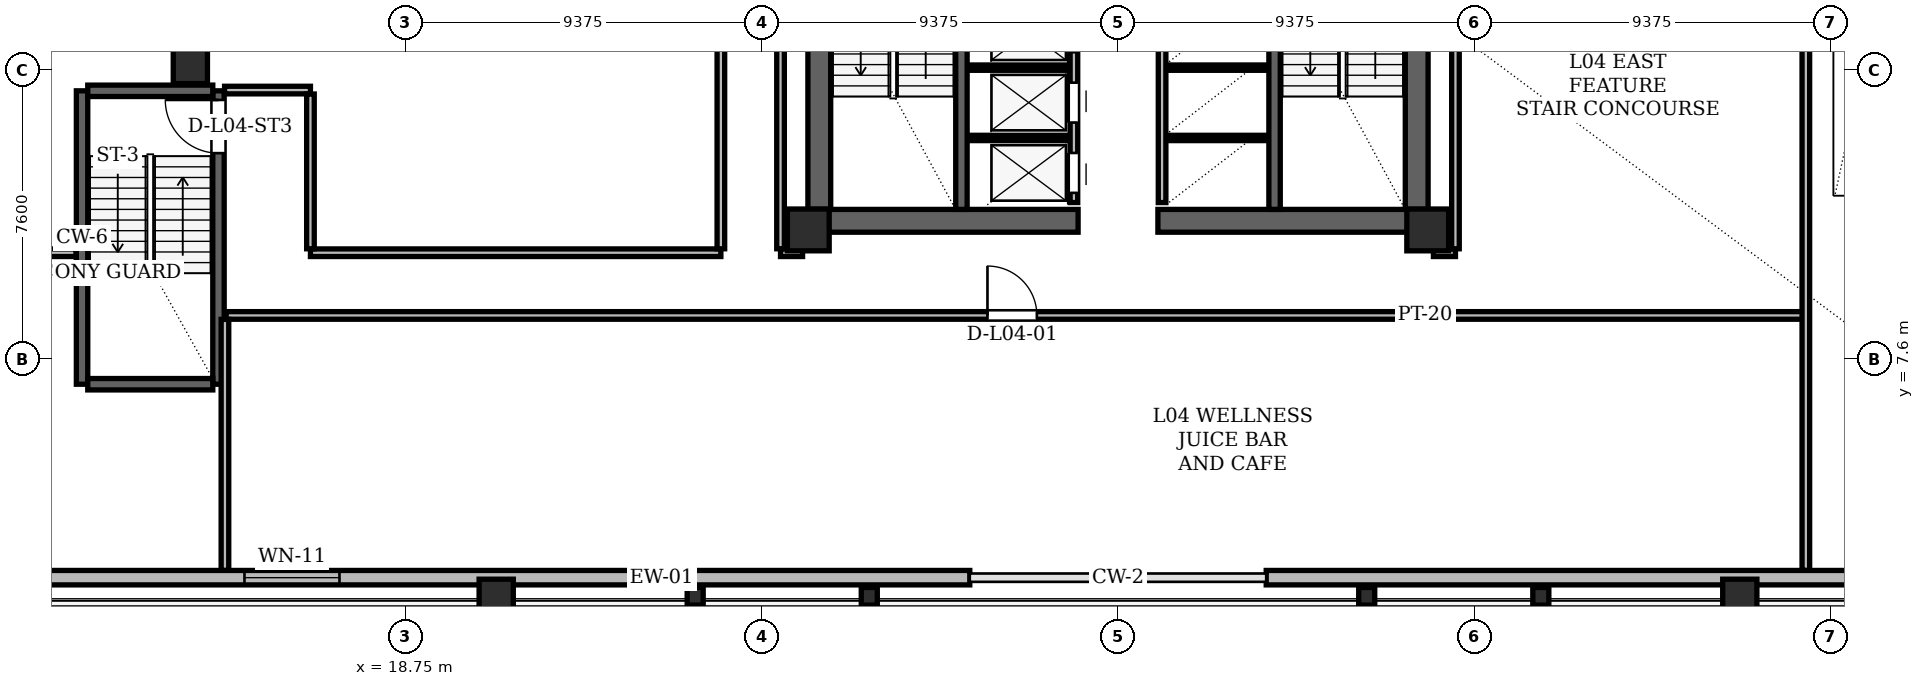
"""IFC4 building model, lengths in metres.
Left out: names, types, materials, properties, quantities, classifications, styles, units other than length and angle.
Written with IfcOpenShell. Run it as: python <this file> out.ifc"""

import sys

from ifc_helpers import new_model, si_unit, direction, frame, frame_2d, origin, origin_2d, place, context, subcontext, project, spatial, rectangle, hollow_rectangle, i_section, extrude, element, fill, save


model = new_model("IFC4")
c1 = context("Model", 3, precision=1e-05, world=origin(), true_north=direction((0.0, 1.0)))
c2 = subcontext(c1, "Body", "Model", "MODEL_VIEW")
j1 = project(units=[si_unit("LENGTHUNIT", "METRE"), si_unit("PLANEANGLEUNIT", "RADIAN")], contexts=[c1])
p1 = place(None, origin())
s1 = spatial("IfcSite", under=j1, at=p1, CompositionType="ELEMENT")
p2 = place(p1, origin())
s2 = spatial("IfcBuilding", under=s1, at=p2, CompositionType="ELEMENT")
p3 = place(p2, frame((0.0, 0.0, 18.3)))
s3 = spatial("IfcBuildingStorey", under=s2, at=p3, CompositionType="ELEMENT", Elevation=18.3)
for number, where, z_axis, x_axis in (
    (1, (29.35, 11.0, 0.0), (0.0, 0.0, 1.0), (1.0, 0.0, 0.0)),
    (2, (45.65, 11.0, 0.0), (0.0, 0.0, 1.0), (1.0, 0.0, 0.0)),
):
    element("IfcColumn", number, at=place(p3, frame(where, z_axis=z_axis, x_axis=x_axis)), inside=s3, PredefinedType="COLUMN", context=c2, shape_type="SweptSolid", body=[
        extrude(hollow_rectangle(XDim=1.1, YDim=1.1, WallThickness=0.09, at=origin_2d()), origin(), (0.0, 0.0, 1.0), 4.2),
    ])
for number, where, z_axis, x_axis in (
    (3, (13.09, 15.3, 0.004), (0.0, 0.0, 1.0), (1.0, 0.0, 0.0)),
    (4, (21.138, 1.36, 0.004), (0.0, 0.0, 1.0), (1.0, 0.0, 0.0)),
    (5, (53.862, 1.36, 0.004), (0.0, 0.0, 1.0), (1.0, 0.0, 0.0)),
):
    element("IfcColumn", number, at=place(p3, frame(where, z_axis=z_axis, x_axis=x_axis)), inside=s3, PredefinedType="COLUMN", context=c2, shape_type="SweptSolid", body=[
        extrude(hollow_rectangle(XDim=0.9, YDim=0.9, WallThickness=0.075, at=origin_2d()), origin(), (0.0, 0.0, 1.0), 4.191),
    ])
for number, where, z_axis, x_axis in (
    (6, (26.374, 1.36, 0.004), (0.0, 0.0, 1.0), (1.0, 0.0, 0.0)),
    (7, (30.955, 1.36, 0.004), (0.0, 0.0, 1.0), (1.0, 0.0, 0.0)),
    (8, (44.045, 1.36, 0.004), (0.0, 0.0, 1.0), (1.0, 0.0, 0.0)),
    (9, (48.626, 1.36, 0.004), (0.0, 0.0, 1.0), (1.0, 0.0, 0.0)),
):
    element("IfcColumn", number, at=place(p3, frame(where, z_axis=z_axis, x_axis=x_axis)), inside=s3, PredefinedType="COLUMN", context=c2, shape_type="SweptSolid", body=[
        extrude(i_section(OverallWidth=0.422, OverallDepth=0.465, WebThickness=0.045, FlangeThickness=0.072, at=origin_2d()), origin(), (0.0, 0.0, 1.0), 4.191),
    ])
for number, where, z_axis, x_axis in (
    (10, (29.64, 11.0, 0.0), (0.0, 0.0, 1.0), (0.0, 1.0, 0.0)),
    (11, (45.36, 11.0, 0.0), (0.0, 0.0, 1.0), (0.0, 1.0, 0.0)),
):
    element("IfcWall", number, at=place(p3, frame(where, z_axis=z_axis, x_axis=x_axis)), inside=s3, PredefinedType="SHEAR", context=c2, shape_type="SweptSolid", body=[
        extrude(rectangle(XDim=13.3, YDim=0.6, at=frame_2d((6.65, 0.0))), origin(), (0.0, 0.0, 1.0), 3.88),
    ])
for number, where, z_axis, x_axis in (
    (12, (29.35, 11.24, 0.0), (0.0, 0.0, 1.0), (1.0, 0.0, 0.0)),
    (13, (38.55, 11.24, 0.0), (0.0, 0.0, 1.0), (1.0, 0.0, 0.0)),
):
    element("IfcWall", number, at=place(p3, frame(where, z_axis=z_axis, x_axis=x_axis)), inside=s3, PredefinedType="SHEAR", context=c2, shape_type="SweptSolid", body=[
        extrude(rectangle(XDim=7.1, YDim=0.6, at=frame_2d((3.55, 0.0))), origin(), (0.0, 0.0, 1.0), 3.88),
    ])
for number, where, z_axis, x_axis in (
    (14, (33.38, 11.54, 0.0), (0.0, 0.0, 1.0), (0.0, 1.0, 0.0)),
    (15, (41.62, 11.54, 0.0), (0.0, 0.0, 1.0), (0.0, 1.0, 0.0)),
):
    element("IfcWall", number, at=place(p3, frame(where, z_axis=z_axis, x_axis=x_axis)), inside=s3, PredefinedType="SHEAR", context=c2, shape_type="SweptSolid", body=[
        extrude(rectangle(XDim=7.62, YDim=0.3, at=frame_2d((3.81, 0.0))), origin(), (0.0, 0.0, 1.0), 3.88),
    ])
p4 = place(p3, frame((10.24, 6.94, 0.0), z_axis=(0.0, 0.0, 1.0), x_axis=(0.0, 1.0, 0.0)))
e16 = element("IfcWall", 16, at=p4, inside=s3, PredefinedType="SHEAR", context=c2, shape_type="SweptSolid", body=[
    extrude(rectangle(XDim=7.72, YDim=0.3, at=frame_2d((3.86, 0.0))), origin(), (0.0, 0.0, 1.0), 3.88),
])
p5 = place(p3, frame((13.83, 6.94, 0.0), z_axis=(0.0, 0.0, 1.0), x_axis=(0.0, 1.0, 0.0)))
e17 = element("IfcWall", 17, at=p5, inside=s3, PredefinedType="SHEAR", context=c2, shape_type="SweptSolid", body=[
    extrude(rectangle(XDim=7.72, YDim=0.3, at=frame_2d((3.86, 0.0))), origin(), (0.0, 0.0, 1.0), 3.88),
])
p6 = place(p5, frame((6.08, 0.0, 0.0)))
e18 = element("IfcOpeningElement", 18, at=p6, cuts=e17, PredefinedType="OPENING", context=c2, shape_type="SweptSolid", body=[
    extrude(rectangle(XDim=1.4, YDim=2.2, at=frame_2d((0.7, 1.1))), frame((0.0, 0.15, 0.0), z_axis=(0.0, -1.0, 0.0), x_axis=(1.0, 0.0, 0.0)), (0.0, 0.0, 1.0), 0.3),
])
for number, where, z_axis, x_axis in (
    (19, (10.39, 6.94, 0.0), (0.0, 0.0, 1.0), (1.0, 0.0, 0.0)),
    (20, (10.39, 14.66, 0.0), (0.0, 0.0, 1.0), (1.0, 0.0, 0.0)),
):
    element("IfcWall", number, at=place(p3, frame(where, z_axis=z_axis, x_axis=x_axis)), inside=s3, PredefinedType="SHEAR", context=c2, shape_type="SweptSolid", body=[
        extrude(rectangle(XDim=3.29, YDim=0.3, at=frame_2d((1.645, 0.0))), origin(), (0.0, 0.0, 1.0), 3.88),
    ])
p7 = place(p3, frame((8.828, 1.85, 0.0), z_axis=(0.0, 0.0, 1.0), x_axis=(1.0, 0.0, 0.0)))
e21 = element("IfcWall", 21, at=p7, inside=s3, PredefinedType="SOLIDWALL", context=c2, shape_type="SweptSolid", body=[
    extrude(rectangle(XDim=24.772, YDim=0.38, at=frame_2d((12.386, 0.0))), origin(), (0.0, 0.0, 1.0), 2.943),
])
p8 = place(p7, frame((5.686, 0.0, 0.85)))
e22 = element("IfcOpeningElement", 22, at=p8, cuts=e21, PredefinedType="OPENING", context=c2, shape_type="SweptSolid", body=[
    extrude(rectangle(XDim=2.5, YDim=1.923, at=frame_2d((1.25, 0.961))), frame((0.0, 0.19, 0.0), z_axis=(0.0, -1.0, 0.0), x_axis=(1.0, 0.0, 0.0)), (0.0, 0.0, 1.0), 0.38),
])
p9 = place(p3, frame((41.4, 1.85, 0.0), z_axis=(0.0, 0.0, 1.0), x_axis=(1.0, 0.0, 0.0)))
e23 = element("IfcWall", 23, at=p9, inside=s3, PredefinedType="SOLIDWALL", context=c2, shape_type="SweptSolid", body=[
    extrude(rectangle(XDim=24.772, YDim=0.38, at=frame_2d((12.386, 0.0))), origin(), (0.0, 0.0, 1.0), 2.943),
])
p10 = place(p9, frame((16.586, 0.0, 0.85)))
e24 = element("IfcOpeningElement", 24, at=p10, cuts=e23, PredefinedType="OPENING", context=c2, shape_type="SweptSolid", body=[
    extrude(rectangle(XDim=2.5, YDim=1.923, at=frame_2d((1.25, 0.961))), frame((0.0, 0.19, 0.0), z_axis=(0.0, -1.0, 0.0), x_axis=(1.0, 0.0, 0.0)), (0.0, 0.0, 1.0), 0.38),
])
p11 = place(p3, frame((36.34, 11.72, 0.0), z_axis=(0.0, 0.0, 1.0), x_axis=(0.0, 1.0, 0.0)))
e25 = element("IfcWall", 25, at=p11, inside=s3, PredefinedType="PARTITIONING", context=c2, shape_type="SweptSolid", body=[
    extrude(rectangle(XDim=7.6, YDim=0.2, at=frame_2d((3.8, 0.0))), origin(), (0.0, 0.0, 1.0), 3.88),
])
p12 = place(p11, frame((0.255, 0.0, 0.0)))
e26 = element("IfcOpeningElement", 26, at=p12, cuts=e25, PredefinedType="OPENING", context=c2, shape_type="SweptSolid", body=[
    extrude(rectangle(XDim=1.05, YDim=2.15, at=frame_2d((0.525, 1.075))), frame((0.0, 0.1, 0.0), z_axis=(0.0, -1.0, 0.0), x_axis=(1.0, 0.0, 0.0)), (0.0, 0.0, 1.0), 0.2),
])
p13 = place(p11, frame((2.105, 0.0, 0.0)))
e27 = element("IfcOpeningElement", 27, at=p13, cuts=e25, PredefinedType="OPENING", context=c2, shape_type="SweptSolid", body=[
    extrude(rectangle(XDim=1.05, YDim=2.15, at=frame_2d((0.525, 1.075))), frame((0.0, 0.1, 0.0), z_axis=(0.0, -1.0, 0.0), x_axis=(1.0, 0.0, 0.0)), (0.0, 0.0, 1.0), 0.2),
])
p14 = place(p11, frame((3.955, 0.0, 0.0)))
e28 = element("IfcOpeningElement", 28, at=p14, cuts=e25, PredefinedType="OPENING", context=c2, shape_type="SweptSolid", body=[
    extrude(rectangle(XDim=1.05, YDim=2.15, at=frame_2d((0.525, 1.075))), frame((0.0, 0.1, 0.0), z_axis=(0.0, -1.0, 0.0), x_axis=(1.0, 0.0, 0.0)), (0.0, 0.0, 1.0), 0.2),
])
for number, where, z_axis, x_axis in (
    (29, (33.56, 13.42, 0.0), (0.0, 0.0, 1.0), (1.0, 0.0, 0.0)),
    (30, (33.56, 15.27, 0.0), (0.0, 0.0, 1.0), (1.0, 0.0, 0.0)),
):
    element("IfcWall", number, at=place(p3, frame(where, z_axis=z_axis, x_axis=x_axis)), inside=s3, PredefinedType="PARTITIONING", context=c2, shape_type="SweptSolid", body=[
        extrude(rectangle(XDim=2.66, YDim=0.14, at=frame_2d((1.33, 0.0))), origin(), (0.0, 0.0, 1.0), 3.88),
    ])
p15 = place(p3, frame((38.66, 11.72, 0.0), z_axis=(0.0, 0.0, 1.0), x_axis=(0.0, 1.0, 0.0)))
e31 = element("IfcWall", 31, at=p15, inside=s3, PredefinedType="PARTITIONING", context=c2, shape_type="SweptSolid", body=[
    extrude(rectangle(XDim=9.1, YDim=0.2, at=frame_2d((4.55, 0.0))), origin(), (0.0, 0.0, 1.0), 3.88),
])
for number, where, z_axis, x_axis in (
    (32, (38.78, 13.42, 0.0), (0.0, 0.0, 1.0), (1.0, 0.0, 0.0)),
    (33, (38.78, 15.27, 0.0), (0.0, 0.0, 1.0), (1.0, 0.0, 0.0)),
):
    element("IfcWall", number, at=place(p3, frame(where, z_axis=z_axis, x_axis=x_axis)), inside=s3, PredefinedType="PARTITIONING", context=c2, shape_type="SweptSolid", body=[
        extrude(rectangle(XDim=2.66, YDim=0.14, at=frame_2d((1.33, 0.0))), origin(), (0.0, 0.0, 1.0), 3.88),
    ])
p16 = place(p3, frame((14.03, 8.75, 0.0), z_axis=(0.0, 0.0, 1.0), x_axis=(1.0, 0.0, 0.0)))
e34 = element("IfcWall", 34, at=p16, inside=s3, PredefinedType="PARTITIONING", context=c2, shape_type="SweptSolid", body=[
    extrude(rectangle(XDim=41.57, YDim=0.2, at=frame_2d((20.785, 0.0))), origin(), (0.0, 0.0, 1.0), 2.943),
])
p17 = place(p16, frame((20.035, 0.0, 0.0)))
e35 = element("IfcOpeningElement", 35, at=p17, cuts=e34, PredefinedType="OPENING", context=c2, shape_type="SweptSolid", body=[
    extrude(rectangle(XDim=1.3, YDim=2.2, at=frame_2d((0.65, 1.1))), frame((0.0, 0.1, 0.0), z_axis=(0.0, -1.0, 0.0), x_axis=(1.0, 0.0, 0.0)), (0.0, 0.0, 1.0), 0.2),
])
p18 = place(p3, frame((6.344, 10.4, 0.0), z_axis=(0.0, 0.0, 1.0), x_axis=(1.0, 0.0, 0.0)))
e36 = element("IfcWall", 36, at=p18, inside=s3, PredefinedType="PARTITIONING", context=c2, shape_type="SweptSolid", body=[
    extrude(rectangle(XDim=3.736, YDim=0.2, at=frame_2d((1.868, 0.0))), origin(), (0.0, 0.0, 1.0), 2.943),
])
p19 = place(p3, frame((16.25, 10.4, 0.0), z_axis=(0.0, 0.0, 1.0), x_axis=(1.0, 0.0, 0.0)))
e37 = element("IfcWall", 37, at=p19, inside=s3, PredefinedType="PARTITIONING", context=c2, shape_type="SweptSolid", body=[
    extrude(rectangle(XDim=10.8, YDim=0.2, at=frame_2d((5.4, 0.0))), origin(), (0.0, 0.0, 1.0), 3.88),
])
for number, where, z_axis, x_axis in (
    (38, (28.62, 10.4, 0.0), (0.0, 0.0, 1.0), (1.0, 0.0, 0.0)),
    (39, (45.8, 10.4, 0.0), (0.0, 0.0, 1.0), (1.0, 0.0, 0.0)),
):
    element("IfcWall", number, at=place(p3, frame(where, z_axis=z_axis, x_axis=x_axis)), inside=s3, PredefinedType="PARTITIONING", context=c2, shape_type="SweptSolid", body=[
        extrude(rectangle(XDim=0.58, YDim=0.2, at=frame_2d((0.29, 0.0))), origin(), (0.0, 0.0, 1.0), 2.943),
    ])
p20 = place(p3, frame((13.99, 14.68, 0.0), z_axis=(0.0, 0.0, 1.0), x_axis=(1.0, 0.0, 0.0)))
e40 = element("IfcWall", 40, at=p20, inside=s3, PredefinedType="PARTITIONING", context=c2, shape_type="SweptSolid", body=[
    extrude(rectangle(XDim=2.26, YDim=0.2, at=frame_2d((1.13, 0.0))), origin(), (0.0, 0.0, 1.0), 2.943),
])
p21 = place(p3, frame((14.0, 2.044, 0.0), z_axis=(0.0, 0.0, 1.0), x_axis=(0.0, 1.0, 0.0)))
e41 = element("IfcWall", 41, at=p21, inside=s3, PredefinedType="PARTITIONING", context=c2, shape_type="SweptSolid", body=[
    extrude(rectangle(XDim=6.602, YDim=0.2, at=frame_2d((3.301, 0.0))), origin(), (0.0, 0.0, 1.0), 3.88),
])
p22 = place(p3, frame((16.25, 10.504, 0.0), z_axis=(0.0, 0.0, 1.0), x_axis=(0.0, 1.0, 0.0)))
e42 = element("IfcWall", 42, at=p22, inside=s3, PredefinedType="PARTITIONING", context=c2, shape_type="SweptSolid", body=[
    extrude(rectangle(XDim=4.072, YDim=0.2, at=frame_2d((2.036, 0.0))), origin(), (0.0, 0.0, 1.0), 2.943),
])
p23 = place(p3, frame((27.05, 10.504, 0.0), z_axis=(0.0, 0.0, 1.0), x_axis=(0.0, 1.0, 0.0)))
e43 = element("IfcWall", 43, at=p23, inside=s3, PredefinedType="PARTITIONING", context=c2, shape_type="SweptSolid", body=[
    extrude(rectangle(XDim=28.376, YDim=0.2, at=frame_2d((14.188, 0.0))), origin(), (0.0, 0.0, 1.0), 2.943),
])
p24 = place(p23, frame((5.975, 0.0, 0.0)))
e44 = element("IfcOpeningElement", 44, at=p24, cuts=e43, PredefinedType="OPENING", context=c2, shape_type="SweptSolid", body=[
    extrude(rectangle(XDim=1.3, YDim=2.2, at=frame_2d((0.65, 1.1))), frame((0.0, 0.1, 0.0), z_axis=(0.0, -1.0, 0.0), x_axis=(1.0, 0.0, 0.0)), (0.0, 0.0, 1.0), 0.2),
])
p25 = place(p3, frame((28.62, 10.504, 0.0), z_axis=(0.0, 0.0, 1.0), x_axis=(0.0, 1.0, 0.0)))
e45 = element("IfcWall", 45, at=p25, inside=s3, PredefinedType="PARTITIONING", context=c2, shape_type="SweptSolid", body=[
    extrude(rectangle(XDim=14.142, YDim=0.2, at=frame_2d((7.071, 0.0))), origin(), (0.0, 0.0, 1.0), 2.943),
])
p26 = place(p3, frame((46.38, 10.504, 0.0), z_axis=(0.0, 0.0, 1.0), x_axis=(0.0, 1.0, 0.0)))
e46 = element("IfcWall", 46, at=p26, inside=s3, PredefinedType="PARTITIONING", context=c2, shape_type="SweptSolid", body=[
    extrude(rectangle(XDim=14.142, YDim=0.2, at=frame_2d((7.071, 0.0))), origin(), (0.0, 0.0, 1.0), 3.88),
])
p27 = place(p3, frame((55.6, 2.044, 0.0), z_axis=(0.0, 0.0, 1.0), x_axis=(0.0, 1.0, 0.0)))
e47 = element("IfcWall", 47, at=p27, inside=s3, PredefinedType="PARTITIONING", context=c2, shape_type="SweptSolid", body=[
    extrude(rectangle(XDim=41.512, YDim=0.2, at=frame_2d((20.756, 0.0))), origin(), (0.0, 0.0, 1.0), 2.67),
])
p28 = place(p27, frame((14.435, 0.0, 0.0)))
e48 = element("IfcOpeningElement", 48, at=p28, cuts=e47, PredefinedType="OPENING", context=c2, shape_type="SweptSolid", body=[
    extrude(rectangle(XDim=1.3, YDim=2.2, at=frame_2d((0.65, 1.1))), frame((0.0, 0.1, 0.0), z_axis=(0.0, -1.0, 0.0), x_axis=(1.0, 0.0, 0.0)), (0.0, 0.0, 1.0), 0.2),
])
p29 = place(p8, origin())
e49 = element("IfcWindow", 49, at=p29, inside=s3, PartitioningType="SINGLE_PANEL", PredefinedType="WINDOW", context=c2, shape_type="SweptSolid", body=[
    extrude(rectangle(XDim=2.5, YDim=1.923, at=frame_2d((1.25, 0.961))), frame((0.0, 0.03, 0.0), z_axis=(0.0, -1.0, 0.0), x_axis=(1.0, 0.0, 0.0)), (0.0, 0.0, 1.0), 0.06),
])
fill(e22, e49)
p30 = place(p12, origin())
e50 = element("IfcDoor", 50, at=p30, inside=s3, OperationType="SLIDING_TO_LEFT", PredefinedType="DOOR", context=c2, shape_type="SweptSolid", body=[
    extrude(rectangle(XDim=1.05, YDim=2.15, at=frame_2d((0.525, 1.075))), frame((0.0, 0.025, 0.0), z_axis=(0.0, -1.0, 0.0), x_axis=(1.0, 0.0, 0.0)), (0.0, 0.0, 1.0), 0.05),
])
fill(e26, e50)
p31 = place(p13, origin())
e51 = element("IfcDoor", 51, at=p31, inside=s3, OperationType="SLIDING_TO_RIGHT", PredefinedType="DOOR", context=c2, shape_type="SweptSolid", body=[
    extrude(rectangle(XDim=1.05, YDim=2.15, at=frame_2d((0.525, 1.075))), frame((0.0, 0.025, 0.0), z_axis=(0.0, -1.0, 0.0), x_axis=(1.0, 0.0, 0.0)), (0.0, 0.0, 1.0), 0.05),
])
fill(e27, e51)
p32 = place(p14, origin())
e52 = element("IfcDoor", 52, at=p32, inside=s3, OperationType="SLIDING_TO_LEFT", PredefinedType="DOOR", context=c2, shape_type="SweptSolid", body=[
    extrude(rectangle(XDim=1.05, YDim=2.15, at=frame_2d((0.525, 1.075))), frame((0.0, 0.025, 0.0), z_axis=(0.0, -1.0, 0.0), x_axis=(1.0, 0.0, 0.0)), (0.0, 0.0, 1.0), 0.05),
])
fill(e28, e52)
p33 = place(p6, origin())
e53 = element("IfcDoor", 53, at=p33, inside=s3, OperationType="SINGLE_SWING_RIGHT", PredefinedType="DOOR", context=c2, shape_type="SweptSolid", body=[
    extrude(rectangle(XDim=1.4, YDim=2.2, at=frame_2d((0.7, 1.1))), frame((0.0, 0.025, 0.0), z_axis=(0.0, -1.0, 0.0), x_axis=(1.0, 0.0, 0.0)), (0.0, 0.0, 1.0), 0.05),
])
fill(e18, e53)
p34 = place(p17, origin())
e54 = element("IfcDoor", 54, at=p34, inside=s3, OperationType="SINGLE_SWING_LEFT", PredefinedType="DOOR", context=c2, shape_type="SweptSolid", body=[
    extrude(rectangle(XDim=1.3, YDim=2.2, at=frame_2d((0.65, 1.1))), frame((0.0, 0.025, 0.0), z_axis=(0.0, -1.0, 0.0), x_axis=(1.0, 0.0, 0.0)), (0.0, 0.0, 1.0), 0.05),
])
fill(e35, e54)
save(model, sys.argv[1])
